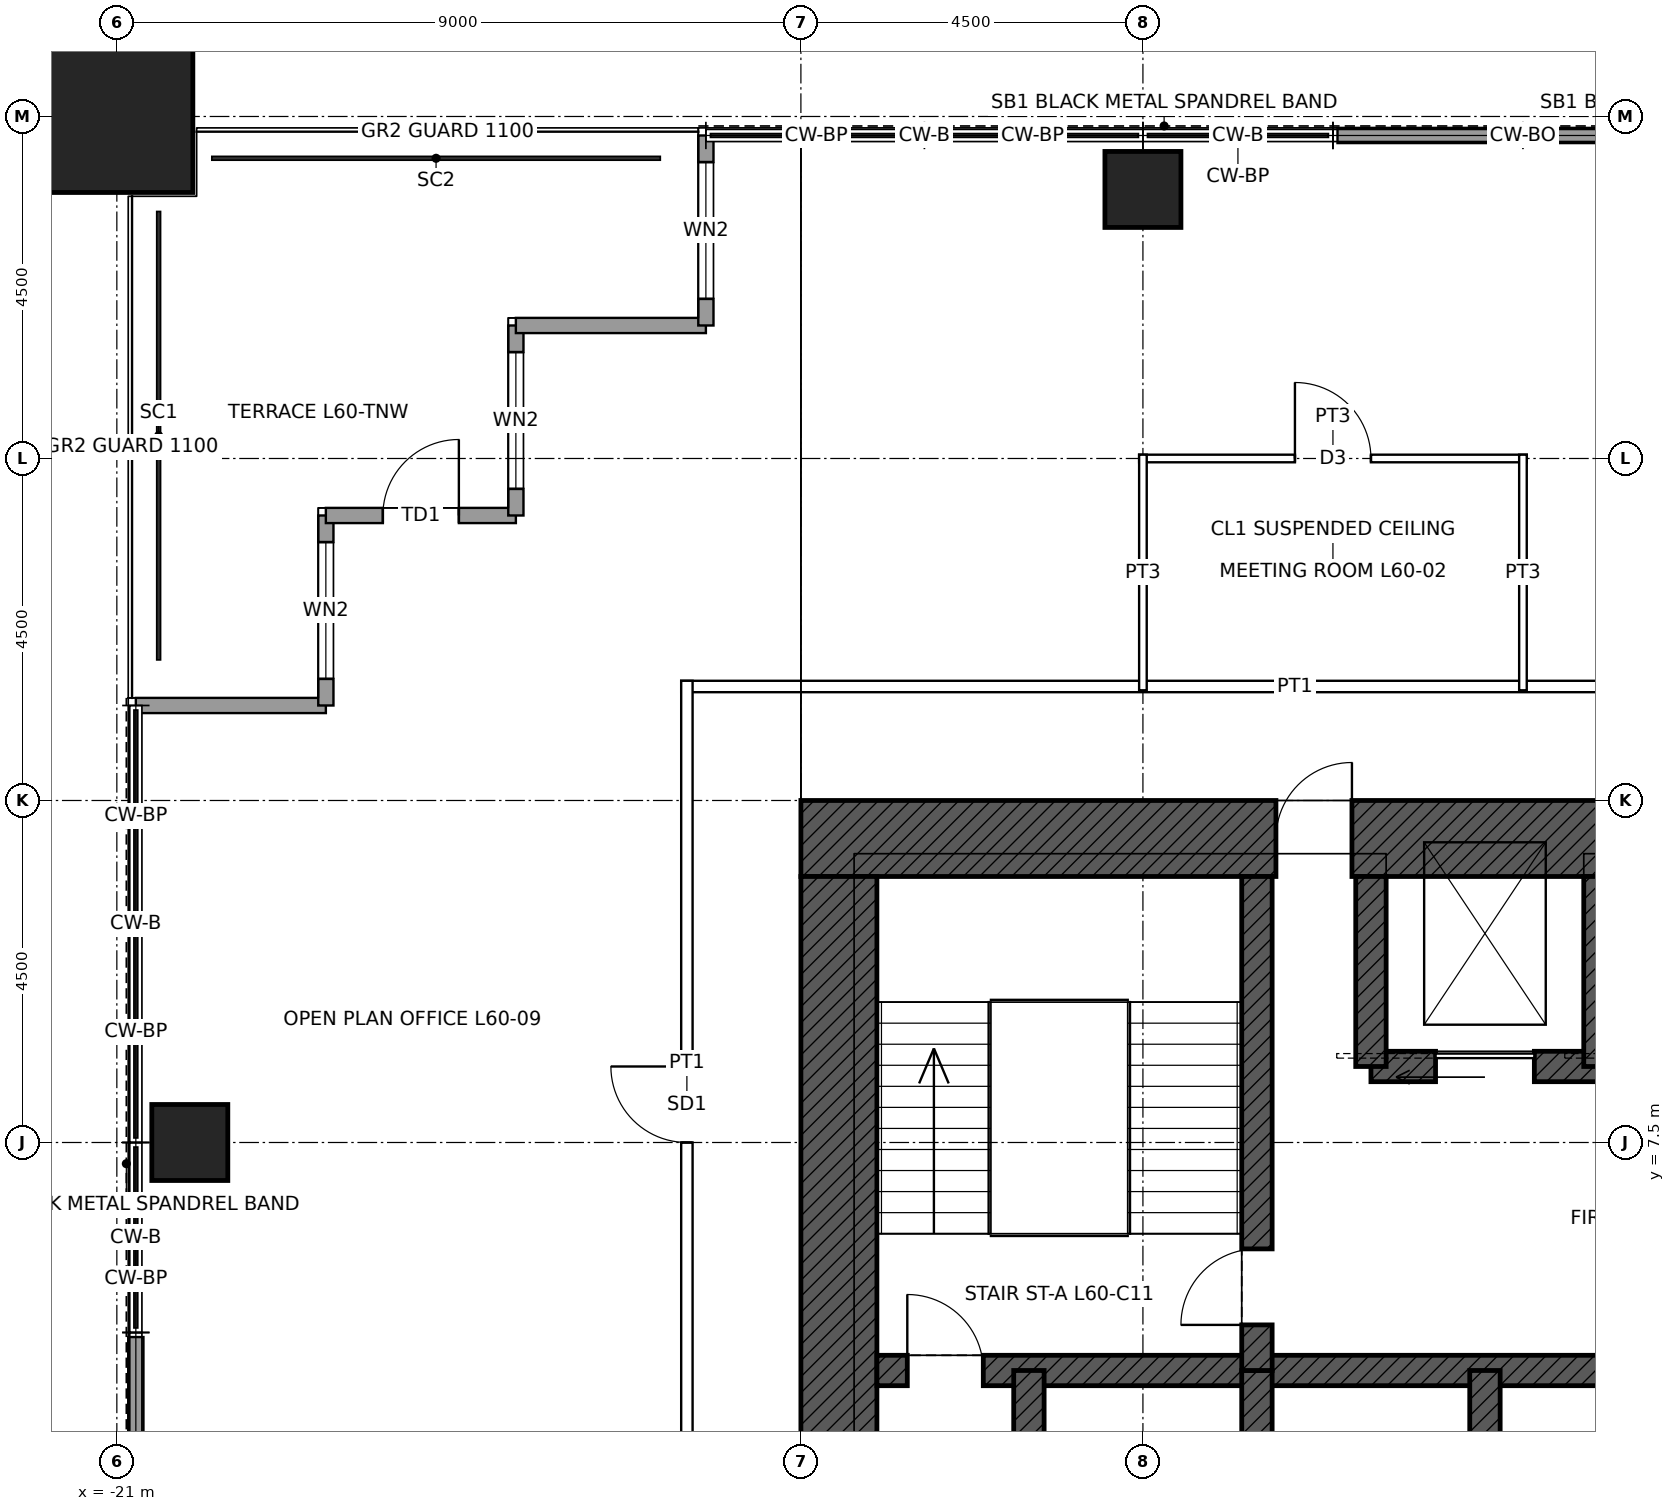
"""IFC4 building model, lengths in metres.
Left out: names, types, materials, properties, quantities, classifications, styles, units other than length and angle.
Written with IfcOpenShell. Run it as: python <this file> out.ifc"""

import sys

from ifc_helpers import new_model, si_unit, direction, frame, frame_2d, origin, origin_2d, place, context, subcontext, project, spatial, rectangle, hollow_rectangle, extrude, element, fill, save


model = new_model("IFC4")
c1 = context("Model", 3, precision=1e-05, world=origin(), true_north=direction((0.0, 1.0)))
c2 = subcontext(c1, "Body", "Model", "MODEL_VIEW")
j1 = project(units=[si_unit("LENGTHUNIT", "METRE"), si_unit("PLANEANGLEUNIT", "RADIAN")], contexts=[c1])
p1 = place(None, origin())
s1 = spatial("IfcSite", under=j1, at=p1, CompositionType="ELEMENT")
p2 = place(p1, origin())
s2 = spatial("IfcBuilding", under=s1, at=p2, CompositionType="ELEMENT")
p3 = place(p2, frame((0.0, 0.0, 275.9)))
s3 = spatial("IfcBuildingStorey", under=s2, at=p3, CompositionType="ELEMENT", Elevation=275.9)
p4 = place(p3, frame((-21.0, 21.0, 0.0), z_axis=(0.0, 0.0, 1.0), x_axis=(1.0, 0.0, 0.0)))
e1 = element("IfcColumn", 1, at=p4, inside=s3, PredefinedType="COLUMN", context=c2, shape_type="SweptSolid", body=[
    extrude(hollow_rectangle(XDim=2.0, YDim=2.0, WallThickness=0.095, at=origin_2d()), origin(), (0.0, 0.0, 1.0), 4.0),
])
for number, where, z_axis, x_axis in (
    (2, (-7.5, 20.04, 0.0), (0.0, 0.0, 1.0), (1.0, 0.0, 0.0)),
    (3, (-20.04, 7.5, 0.0), (0.0, 0.0, 1.0), (1.0, 0.0, 0.0)),
):
    element("IfcColumn", number, at=place(p3, frame(where, z_axis=z_axis, x_axis=x_axis)), inside=s3, PredefinedType="COLUMN", context=c2, shape_type="SweptSolid", body=[
        extrude(hollow_rectangle(XDim=1.0, YDim=1.0, WallThickness=0.075, at=origin_2d()), origin(), (0.0, 0.0, 1.0), 4.0),
    ])
p5 = place(p3, frame((-12.0, 11.5, 0.0), z_axis=(0.0, 0.0, 1.0), x_axis=(1.0, 0.0, 0.0)))
e4 = element("IfcWall", 4, at=p5, inside=s3, PredefinedType="SHEAR", context=c2, shape_type="SweptSolid", body=[
    extrude(rectangle(XDim=24.0, YDim=1.0, at=frame_2d((12.0, 0.0))), origin(), (0.0, 0.0, 1.0), 4.0),
])
p6 = place(p5, frame((6.25, 0.0, 0.0)))
e5 = element("IfcOpeningElement", 5, at=p6, cuts=e4, PredefinedType="OPENING", context=c2, shape_type="SweptSolid", body=[
    extrude(rectangle(XDim=1.0, YDim=2.4, at=frame_2d((0.5, 1.2))), frame((0.0, 0.51, 0.0), z_axis=(0.0, -1.0, 0.0), x_axis=(1.0, 0.0, 0.0)), (0.0, 0.0, 1.0), 1.02),
])
p7 = place(p5, frame((16.75, 0.0, 0.0)))
e6 = element("IfcOpeningElement", 6, at=p7, cuts=e4, PredefinedType="OPENING", context=c2, shape_type="SweptSolid", body=[
    extrude(rectangle(XDim=1.0, YDim=2.4, at=frame_2d((0.5, 1.2))), frame((0.0, 0.51, 0.0), z_axis=(0.0, -1.0, 0.0), x_axis=(1.0, 0.0, 0.0)), (0.0, 0.0, 1.0), 1.02),
])
p8 = place(p3, frame((-11.5, -11.0, 0.0), z_axis=(0.0, 0.0, 1.0), x_axis=(0.0, 1.0, 0.0)))
e7 = element("IfcWall", 7, at=p8, inside=s3, PredefinedType="SHEAR", context=c2, shape_type="SweptSolid", body=[
    extrude(rectangle(XDim=22.0, YDim=1.0, at=frame_2d((11.0, 0.0))), origin(), (0.0, 0.0, 1.0), 4.0),
])
p9 = place(p8, frame((10.5, 0.0, 0.0)))
e8 = element("IfcOpeningElement", 8, at=p9, cuts=e7, PredefinedType="OPENING", context=c2, shape_type="SweptSolid", body=[
    extrude(rectangle(XDim=1.0, YDim=2.4, at=frame_2d((0.5, 1.2))), frame((0.0, 0.51, 0.0), z_axis=(0.0, -1.0, 0.0), x_axis=(1.0, 0.0, 0.0)), (0.0, 0.0, 1.0), 1.02),
])
p10 = place(p3, frame((-11.0, 4.5, 0.0), z_axis=(0.0, 0.0, 1.0), x_axis=(1.0, 0.0, 0.0)))
e9 = element("IfcWall", 9, at=p10, inside=s3, PredefinedType="SHEAR", context=c2, shape_type="SweptSolid", body=[
    extrude(rectangle(XDim=22.0, YDim=0.4, at=frame_2d((11.0, 0.0))), origin(), (0.0, 0.0, 1.0), 4.0),
])
p11 = place(p10, frame((0.4, 0.0, 0.0)))
e10 = element("IfcOpeningElement", 10, at=p11, cuts=e9, PredefinedType="OPENING", context=c2, shape_type="SweptSolid", body=[
    extrude(rectangle(XDim=1.0, YDim=2.1, at=frame_2d((0.5, 1.05))), frame((0.0, 0.21, 0.0), z_axis=(0.0, -1.0, 0.0), x_axis=(1.0, 0.0, 0.0)), (0.0, 0.0, 1.0), 0.42),
])
p12 = place(p10, frame((20.6, 0.0, 0.0)))
e11 = element("IfcOpeningElement", 11, at=p12, cuts=e9, PredefinedType="OPENING", context=c2, shape_type="SweptSolid", body=[
    extrude(rectangle(XDim=1.0, YDim=2.1, at=frame_2d((0.5, 1.05))), frame((0.0, 0.21, 0.0), z_axis=(0.0, -1.0, 0.0), x_axis=(1.0, 0.0, 0.0)), (0.0, 0.0, 1.0), 0.42),
])
p13 = place(p3, frame((-4.5, 8.5, 0.0), z_axis=(0.0, 0.0, 1.0), x_axis=(1.0, 0.0, 0.0)))
e12 = element("IfcWall", 12, at=p13, inside=s3, PredefinedType="SHEAR", context=c2, shape_type="SweptSolid", body=[
    extrude(rectangle(XDim=9.0, YDim=0.4, at=frame_2d((4.5, 0.0))), origin(), (0.0, 0.0, 1.0), 4.0),
])
p14 = place(p13, frame((0.85, 0.0, 0.0)))
e13 = element("IfcOpeningElement", 13, at=p14, cuts=e12, PredefinedType="OPENING", context=c2, shape_type="SweptSolid", body=[
    extrude(rectangle(XDim=1.3, YDim=2.4, at=frame_2d((0.65, 1.2))), frame((0.0, 0.21, 0.0), z_axis=(0.0, -1.0, 0.0), x_axis=(1.0, 0.0, 0.0)), (0.0, 0.0, 1.0), 0.42),
])
p15 = place(p13, frame((6.85, 0.0, 0.0)))
e14 = element("IfcOpeningElement", 14, at=p15, cuts=e12, PredefinedType="OPENING", context=c2, shape_type="SweptSolid", body=[
    extrude(rectangle(XDim=1.3, YDim=2.4, at=frame_2d((0.65, 1.2))), frame((0.0, 0.21, 0.0), z_axis=(0.0, -1.0, 0.0), x_axis=(1.0, 0.0, 0.0)), (0.0, 0.0, 1.0), 0.42),
])
p16 = place(p13, frame((3.85, 0.0, 0.0)))
e15 = element("IfcOpeningElement", 15, at=p16, cuts=e12, PredefinedType="OPENING", context=c2, shape_type="SweptSolid", body=[
    extrude(rectangle(XDim=1.3, YDim=2.4, at=frame_2d((0.65, 1.2))), frame((0.0, 0.21, 0.0), z_axis=(0.0, -1.0, 0.0), x_axis=(1.0, 0.0, 0.0)), (0.0, 0.0, 1.0), 0.42),
])
for number, where, z_axis, x_axis in (
    (16, (-9.0, 1.5, 0.0), (0.0, 0.0, 1.0), (0.0, 1.0, 0.0)),
    (17, (-6.0, 1.5, 0.0), (0.0, 0.0, 1.0), (0.0, 1.0, 0.0)),
    (18, (-3.0, 1.5, 0.0), (0.0, 0.0, 1.0), (0.0, 1.0, 0.0)),
):
    element("IfcWall", number, at=place(p3, frame(where, z_axis=z_axis, x_axis=x_axis)), inside=s3, PredefinedType="SHEAR", context=c2, shape_type="SweptSolid", body=[
        extrude(rectangle(XDim=3.0, YDim=0.4, at=frame_2d((1.5, 0.0))), origin(), (0.0, 0.0, 1.0), 4.0),
    ])
p17 = place(p3, frame((-6.0, 4.5, 0.0), z_axis=(0.0, 0.0, 1.0), x_axis=(0.0, 1.0, 0.0)))
e19 = element("IfcWall", 19, at=p17, inside=s3, PredefinedType="SHEAR", context=c2, shape_type="SweptSolid", body=[
    extrude(rectangle(XDim=6.5, YDim=0.4, at=frame_2d((3.25, 0.0))), origin(), (0.0, 0.0, 1.0), 4.0),
])
p18 = place(p17, frame((0.6, 0.0, 0.0)))
e20 = element("IfcOpeningElement", 20, at=p18, cuts=e19, PredefinedType="OPENING", context=c2, shape_type="SweptSolid", body=[
    extrude(rectangle(XDim=1.0, YDim=2.1, at=frame_2d((0.5, 1.05))), frame((0.0, 0.21, 0.0), z_axis=(0.0, -1.0, 0.0), x_axis=(1.0, 0.0, 0.0)), (0.0, 0.0, 1.0), 0.42),
])
for number, where, z_axis, x_axis in (
    (21, (-4.5, 8.5, 0.0), (0.0, 0.0, 1.0), (0.0, 1.0, 0.0)),
    (22, (-1.5, 8.5, 0.0), (0.0, 0.0, 1.0), (0.0, 1.0, 0.0)),
):
    element("IfcWall", number, at=place(p3, frame(where, z_axis=z_axis, x_axis=x_axis)), inside=s3, PredefinedType="SHEAR", context=c2, shape_type="SweptSolid", body=[
        extrude(rectangle(XDim=2.5, YDim=0.4, at=frame_2d((1.25, 0.0))), origin(), (0.0, 0.0, 1.0), 4.0),
    ])
p19 = place(p3, frame((-20.75, 13.25, 0.0), z_axis=(0.0, 0.0, 1.0), x_axis=(1.0, 0.0, 0.0)))
e23 = element("IfcWall", 23, at=p19, inside=s3, PredefinedType="SOLIDWALL", context=c2, shape_type="SweptSolid", body=[
    extrude(rectangle(XDim=2.5, YDim=0.2, at=frame_2d((1.25, 0.0))), origin(), (0.0, 0.0, 1.0), 3.85),
])
p20 = place(p3, frame((-18.25, 13.25, 0.0), z_axis=(0.0, 0.0, 1.0), x_axis=(0.0, 1.0, 0.0)))
e24 = element("IfcWall", 24, at=p20, inside=s3, PredefinedType="SOLIDWALL", context=c2, shape_type="SweptSolid", body=[
    extrude(rectangle(XDim=2.5, YDim=0.2, at=frame_2d((1.25, 0.0))), origin(), (0.0, 0.0, 1.0), 3.85),
])
p21 = place(p20, frame((0.35, 0.0, 0.3)))
e25 = element("IfcOpeningElement", 25, at=p21, cuts=e24, PredefinedType="OPENING", context=c2, shape_type="SweptSolid", body=[
    extrude(rectangle(XDim=1.8, YDim=2.4, at=frame_2d((0.9, 1.2))), frame((0.0, 0.11, 0.0), z_axis=(0.0, -1.0, 0.0), x_axis=(1.0, 0.0, 0.0)), (0.0, 0.0, 1.0), 0.22),
])
p22 = place(p3, frame((-18.25, 15.75, 0.0), z_axis=(0.0, 0.0, 1.0), x_axis=(1.0, 0.0, 0.0)))
e26 = element("IfcWall", 26, at=p22, inside=s3, PredefinedType="SOLIDWALL", context=c2, shape_type="SweptSolid", body=[
    extrude(rectangle(XDim=2.5, YDim=0.2, at=frame_2d((1.25, 0.0))), origin(), (0.0, 0.0, 1.0), 3.317),
])
p23 = place(p22, frame((0.75, 0.0, 0.0)))
e27 = element("IfcOpeningElement", 27, at=p23, cuts=e26, PredefinedType="OPENING", context=c2, shape_type="SweptSolid", body=[
    extrude(rectangle(XDim=1.0, YDim=2.4, at=frame_2d((0.5, 1.2))), frame((0.0, 0.11, 0.0), z_axis=(0.0, -1.0, 0.0), x_axis=(1.0, 0.0, 0.0)), (0.0, 0.0, 1.0), 0.22),
])
p24 = place(p3, frame((-15.75, 15.75, 0.0), z_axis=(0.0, 0.0, 1.0), x_axis=(0.0, 1.0, 0.0)))
e28 = element("IfcWall", 28, at=p24, inside=s3, PredefinedType="SOLIDWALL", context=c2, shape_type="SweptSolid", body=[
    extrude(rectangle(XDim=2.5, YDim=0.2, at=frame_2d((1.25, 0.0))), origin(), (0.0, 0.0, 1.0), 3.85),
])
p25 = place(p24, frame((0.35, 0.0, 0.3)))
e29 = element("IfcOpeningElement", 29, at=p25, cuts=e28, PredefinedType="OPENING", context=c2, shape_type="SweptSolid", body=[
    extrude(rectangle(XDim=1.8, YDim=2.4, at=frame_2d((0.9, 1.2))), frame((0.0, 0.11, 0.0), z_axis=(0.0, -1.0, 0.0), x_axis=(1.0, 0.0, 0.0)), (0.0, 0.0, 1.0), 0.22),
])
p26 = place(p3, frame((-15.75, 18.25, 0.0), z_axis=(0.0, 0.0, 1.0), x_axis=(1.0, 0.0, 0.0)))
e30 = element("IfcWall", 30, at=p26, inside=s3, PredefinedType="SOLIDWALL", context=c2, shape_type="SweptSolid", body=[
    extrude(rectangle(XDim=2.5, YDim=0.2, at=frame_2d((1.25, 0.0))), origin(), (0.0, 0.0, 1.0), 3.85),
])
p27 = place(p3, frame((-13.25, 18.25, 0.0), z_axis=(0.0, 0.0, 1.0), x_axis=(0.0, 1.0, 0.0)))
e31 = element("IfcWall", 31, at=p27, inside=s3, PredefinedType="SOLIDWALL", context=c2, shape_type="SweptSolid", body=[
    extrude(rectangle(XDim=2.5, YDim=0.2, at=frame_2d((1.25, 0.0))), origin(), (0.0, 0.0, 1.0), 3.85),
])
p28 = place(p27, frame((0.35, 0.0, 0.3)))
e32 = element("IfcOpeningElement", 32, at=p28, cuts=e31, PredefinedType="OPENING", context=c2, shape_type="SweptSolid", body=[
    extrude(rectangle(XDim=1.8, YDim=2.4, at=frame_2d((0.9, 1.2))), frame((0.0, 0.11, 0.0), z_axis=(0.0, -1.0, 0.0), x_axis=(1.0, 0.0, 0.0)), (0.0, 0.0, 1.0), 0.22),
])
for number, where, z_axis, x_axis in (
    (33, (-4.94, 20.75, 0.0), (0.0, 0.0, 1.0), (1.0, 0.0, 0.0)),
    (34, (-2.47, 20.75, 0.0), (0.0, 0.0, 1.0), (1.0, 0.0, 0.0)),
    (35, (-20.75, 2.53, 0.0), (0.0, 0.0, 1.0), (0.0, 1.0, 0.0)),
):
    element("IfcWall", number, at=place(p3, frame(where, z_axis=z_axis, x_axis=x_axis)), inside=s3, PredefinedType="SOLIDWALL", context=c2, shape_type="SweptSolid", body=[
        extrude(rectangle(XDim=2.41, YDim=0.2, at=frame_2d((1.205, 0.0))), origin(), (0.0, 0.0, 1.0), 3.85),
    ])
p29 = place(p3, frame((-13.575, 13.5, 0.0), z_axis=(0.0, 0.0, 1.0), x_axis=(1.0, 0.0, 0.0)))
e36 = element("IfcWall", 36, at=p29, inside=s3, PredefinedType="PARTITIONING", context=c2, shape_type="SweptSolid", body=[
    extrude(rectangle(XDim=16.15, YDim=0.15, at=frame_2d((8.075, 0.0))), origin(), (0.0, 0.0, 1.0), 3.85),
])
p30 = place(p3, frame((-7.55, 16.5, 0.0), z_axis=(0.0, 0.0, 1.0), x_axis=(1.0, 0.0, 0.0)))
e37 = element("IfcWall", 37, at=p30, inside=s3, PredefinedType="PARTITIONING", context=c2, shape_type="SweptSolid", body=[
    extrude(rectangle(XDim=5.1, YDim=0.1, at=frame_2d((2.55, 0.0))), origin(), (0.0, 0.0, 1.0), 3.85),
])
p31 = place(p30, frame((2.05, 0.0, 0.0)))
e38 = element("IfcOpeningElement", 38, at=p31, cuts=e37, PredefinedType="OPENING", context=c2, shape_type="SweptSolid", body=[
    extrude(rectangle(XDim=1.0, YDim=2.1, at=frame_2d((0.5, 1.05))), frame((0.0, 0.06, 0.0), z_axis=(0.0, -1.0, 0.0), x_axis=(1.0, 0.0, 0.0)), (0.0, 0.0, 1.0), 0.12),
])
p32 = place(p3, frame((-13.5, 2.425, 0.0), z_axis=(0.0, 0.0, 1.0), x_axis=(0.0, 1.0, 0.0)))
e39 = element("IfcWall", 39, at=p32, inside=s3, PredefinedType="PARTITIONING", context=c2, shape_type="SweptSolid", body=[
    extrude(rectangle(XDim=11.15, YDim=0.15, at=frame_2d((5.575, 0.0))), origin(), (0.0, 0.0, 1.0), 3.85),
])
p33 = place(p32, frame((5.075, 0.0, 0.0)))
e40 = element("IfcOpeningElement", 40, at=p33, cuts=e39, PredefinedType="OPENING", context=c2, shape_type="SweptSolid", body=[
    extrude(rectangle(XDim=1.0, YDim=2.4, at=frame_2d((0.5, 1.2))), frame((0.0, 0.085, 0.0), z_axis=(0.0, -1.0, 0.0), x_axis=(1.0, 0.0, 0.0)), (0.0, 0.0, 1.0), 0.17),
])
p34 = place(p3, frame((-7.5, 13.45, 0.0), z_axis=(0.0, 0.0, 1.0), x_axis=(0.0, 1.0, 0.0)))
e41 = element("IfcWall", 41, at=p34, inside=s3, PredefinedType="PARTITIONING", context=c2, shape_type="SweptSolid", body=[
    extrude(rectangle(XDim=3.1, YDim=0.1, at=frame_2d((1.55, 0.0))), origin(), (0.0, 0.0, 1.0), 3.243),
])
p35 = place(p3, frame((-2.5, 13.45, 0.0), z_axis=(0.0, 0.0, 1.0), x_axis=(0.0, 1.0, 0.0)))
e42 = element("IfcWall", 42, at=p35, inside=s3, PredefinedType="PARTITIONING", context=c2, shape_type="SweptSolid", body=[
    extrude(rectangle(XDim=3.1, YDim=0.1, at=frame_2d((1.55, 0.0))), origin(), (0.0, 0.0, 1.0), 3.85),
])
p36 = place(p21, origin())
e43 = element("IfcWindow", 43, at=p36, inside=s3, PartitioningType="SINGLE_PANEL", PredefinedType="WINDOW", context=c2, shape_type="SweptSolid", body=[
    extrude(rectangle(XDim=1.8, YDim=2.4, at=frame_2d((0.9, 1.2))), frame((0.0, 0.03, 0.0), z_axis=(0.0, -1.0, 0.0), x_axis=(1.0, 0.0, 0.0)), (0.0, 0.0, 1.0), 0.06),
])
fill(e25, e43)
p37 = place(p23, origin())
e44 = element("IfcDoor", 44, at=p37, inside=s3, OperationType="SINGLE_SWING_RIGHT", PredefinedType="DOOR", context=c2, shape_type="SweptSolid", body=[
    extrude(rectangle(XDim=1.0, YDim=2.4, at=frame_2d((0.5, 1.2))), frame((0.0, 0.025, 0.0), z_axis=(0.0, -1.0, 0.0), x_axis=(1.0, 0.0, 0.0)), (0.0, 0.0, 1.0), 0.05),
])
fill(e27, e44)
p38 = place(p25, origin())
e45 = element("IfcWindow", 45, at=p38, inside=s3, PartitioningType="SINGLE_PANEL", PredefinedType="WINDOW", context=c2, shape_type="SweptSolid", body=[
    extrude(rectangle(XDim=1.8, YDim=2.4, at=frame_2d((0.9, 1.2))), frame((0.0, 0.03, 0.0), z_axis=(0.0, -1.0, 0.0), x_axis=(1.0, 0.0, 0.0)), (0.0, 0.0, 1.0), 0.06),
])
fill(e29, e45)
p39 = place(p28, origin())
e46 = element("IfcWindow", 46, at=p39, inside=s3, PartitioningType="SINGLE_PANEL", PredefinedType="WINDOW", context=c2, shape_type="SweptSolid", body=[
    extrude(rectangle(XDim=1.8, YDim=2.4, at=frame_2d((0.9, 1.2))), frame((0.0, 0.03, 0.0), z_axis=(0.0, -1.0, 0.0), x_axis=(1.0, 0.0, 0.0)), (0.0, 0.0, 1.0), 0.06),
])
fill(e32, e46)
p40 = place(p11, origin())
e47 = element("IfcDoor", 47, at=p40, inside=s3, OperationType="SINGLE_SWING_LEFT", PredefinedType="DOOR", context=c2, shape_type="SweptSolid", body=[
    extrude(rectangle(XDim=1.0, YDim=2.1, at=frame_2d((0.5, 1.05))), frame((0.0, 0.025, 0.0), z_axis=(0.0, -1.0, 0.0), x_axis=(1.0, 0.0, 0.0)), (0.0, 0.0, 1.0), 0.05),
])
fill(e10, e47)
p41 = place(p18, origin())
e48 = element("IfcDoor", 48, at=p41, inside=s3, OperationType="SINGLE_SWING_LEFT", PredefinedType="DOOR", context=c2, shape_type="SweptSolid", body=[
    extrude(rectangle(XDim=1.0, YDim=2.1, at=frame_2d((0.5, 1.05))), frame((0.0, 0.025, 0.0), z_axis=(0.0, -1.0, 0.0), x_axis=(1.0, 0.0, 0.0)), (0.0, 0.0, 1.0), 0.05),
])
fill(e20, e48)
p42 = place(p6, origin())
e49 = element("IfcDoor", 49, at=p42, inside=s3, OperationType="SINGLE_SWING_RIGHT", PredefinedType="DOOR", context=c2, shape_type="SweptSolid", body=[
    extrude(rectangle(XDim=1.0, YDim=2.4, at=frame_2d((0.5, 1.2))), frame((0.0, 0.485, 0.0), z_axis=(0.0, -1.0, 0.0), x_axis=(1.0, 0.0, 0.0)), (0.0, 0.0, 1.0), 0.05),
])
fill(e5, e49)
p43 = place(p14, origin())
e50 = element("IfcDoor", 50, at=p43, inside=s3, OperationType="SLIDING_TO_LEFT", PredefinedType="DOOR", context=c2, shape_type="SweptSolid", body=[
    extrude(rectangle(XDim=1.3, YDim=2.4, at=frame_2d((0.65, 1.2))), frame((0.0, 0.025, 0.0), z_axis=(0.0, -1.0, 0.0), x_axis=(1.0, 0.0, 0.0)), (0.0, 0.0, 1.0), 0.05),
])
fill(e13, e50)
p44 = place(p31, origin())
e51 = element("IfcDoor", 51, at=p44, inside=s3, OperationType="SINGLE_SWING_LEFT", PredefinedType="DOOR", context=c2, shape_type="SweptSolid", body=[
    extrude(rectangle(XDim=1.0, YDim=2.1, at=frame_2d((0.5, 1.05))), frame((0.0, 0.025, 0.0), z_axis=(0.0, -1.0, 0.0), x_axis=(1.0, 0.0, 0.0)), (0.0, 0.0, 1.0), 0.05),
])
fill(e38, e51)
p45 = place(p33, origin())
e52 = element("IfcDoor", 52, at=p45, inside=s3, OperationType="SINGLE_SWING_RIGHT", PredefinedType="DOOR", context=c2, shape_type="SweptSolid", body=[
    extrude(rectangle(XDim=1.0, YDim=2.4, at=frame_2d((0.5, 1.2))), frame((0.0, 0.025, 0.0), z_axis=(0.0, -1.0, 0.0), x_axis=(1.0, 0.0, 0.0)), (0.0, 0.0, 1.0), 0.05),
])
fill(e40, e52)
save(model, sys.argv[1])
